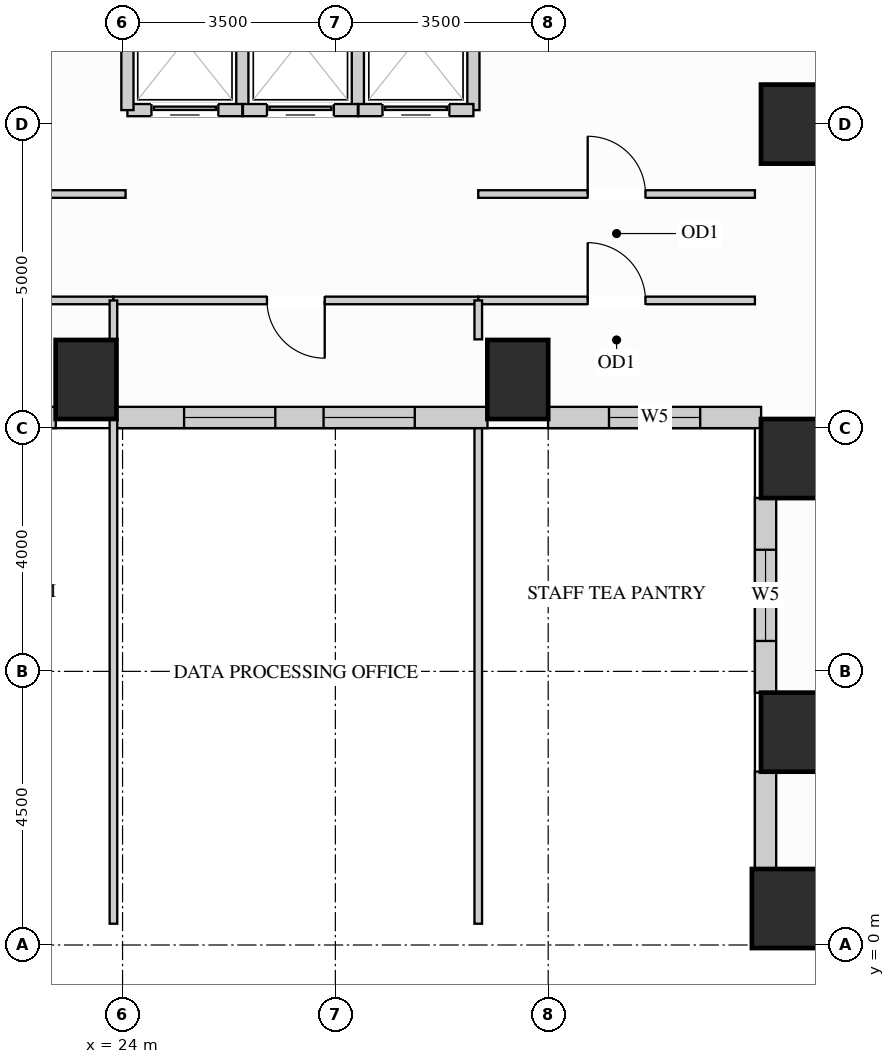
"""IFC4 building model, lengths in metres.
Left out: names, types, materials, properties, quantities, classifications, styles, units other than length and angle.
Written with IfcOpenShell. Run it as: python <this file> out.ifc"""

import sys

from ifc_helpers import new_model, si_unit, direction, frame, frame_2d, origin, origin_2d, place, context, subcontext, project, spatial, rectangle, extrude, source, transform, mapped, element, fill, save


model = new_model("IFC4")
c1 = context("Model", 3, precision=1e-05, world=origin(), true_north=direction((0.0, 1.0)))
c2 = subcontext(c1, "Body", "Model", "MODEL_VIEW")
j1 = project(units=[si_unit("LENGTHUNIT", "METRE"), si_unit("PLANEANGLEUNIT", "RADIAN")], contexts=[c1])
p1 = place(None, origin())
s1 = spatial("IfcSite", under=j1, at=p1, CompositionType="ELEMENT")
p2 = place(p1, origin())
s2 = spatial("IfcBuilding", under=s1, at=p2, CompositionType="ELEMENT")
p3 = place(p2, frame((0.0, 0.0, 36.9)))
s3 = spatial("IfcBuildingStorey", under=s2, at=p3, CompositionType="ELEMENT", Elevation=36.9)
m1 = source(origin(), c2, "Body", "SweptSolid", [
    extrude(rectangle(XDim=1.0, YDim=1.3, at=origin_2d()), origin(), (0.0, 0.0, 1.0), 3.38),
])
for number, where, z_axis, x_axis in (
    (1, (35.0, 13.5, 0.0), (0.0, 0.0, 1.0), (1.0, 0.0, 0.0)),
    (2, (35.0, 3.5, 0.0), (0.0, 0.0, 1.0), (1.0, 0.0, 0.0)),
    (3, (35.0, 8.0, 0.0), (0.0, 0.0, 1.0), (1.0, 0.0, 0.0)),
    (4, (23.4, 9.3, 0.0), (0.0, 0.0, 1.0), (1.0, 0.0, 0.0)),
    (5, (30.5, 9.3, 0.0), (0.0, 0.0, 1.0), (1.0, 0.0, 0.0)),
):
    element("IfcColumn", number, at=place(p3, frame(where, z_axis=z_axis, x_axis=x_axis)), inside=s3, PredefinedType="COLUMN", context=c2, shape_type="MappedRepresentation", body=[
        mapped(m1, transform((0.0, 0.0, 0.0), x_axis=(1.0, 0.0, 0.0), y_axis=(0.0, 1.0, 0.0), z_axis=(0.0, 0.0, 1.0))),
    ])
m2 = source(origin(), c2, "Body", "SweptSolid", [
    extrude(rectangle(XDim=1.3, YDim=1.3, at=origin_2d()), origin(), (0.0, 0.0, 1.0), 3.38),
])
p4 = place(p3, frame((35.0, 0.6, 0.0), z_axis=(0.0, 0.0, 1.0), x_axis=(1.0, 0.0, 0.0)))
e6 = element("IfcColumn", 6, at=p4, inside=s3, PredefinedType="COLUMN", context=c2, shape_type="MappedRepresentation", body=[
    mapped(m2, transform((0.0, 0.0, 0.0), x_axis=(1.0, 0.0, 0.0), y_axis=(0.0, 1.0, 0.0), z_axis=(0.0, 0.0, 1.0))),
])
p5 = place(p3, frame((19.498, 8.675, 0.0), z_axis=(0.0, 0.0, 1.0), x_axis=(1.0, 0.0, 0.0)))
e7 = element("IfcWall", 7, at=p5, inside=s3, PredefinedType="SOLIDWALL", context=c2, shape_type="SweptSolid", body=[
    extrude(rectangle(XDim=3.404, YDim=0.35, at=frame_2d((1.702, 0.0))), origin(), (0.0, 0.0, 1.0), 3.365),
])
p6 = place(p5, frame((0.952, 0.0, 0.78)))
e8 = element("IfcOpeningElement", 8, at=p6, cuts=e7, PredefinedType="OPENING", context=c2, shape_type="SweptSolid", body=[
    extrude(rectangle(XDim=1.5, YDim=2.0, at=frame_2d((0.75, 1.0))), frame((0.0, 0.185, 0.0), z_axis=(0.0, -1.0, 0.0), x_axis=(1.0, 0.0, 0.0)), (0.0, 0.0, 1.0), 0.37),
])
p7 = place(p3, frame((23.898, 8.675, 0.0), z_axis=(0.0, 0.0, 1.0), x_axis=(1.0, 0.0, 0.0)))
e9 = element("IfcWall", 9, at=p7, inside=s3, PredefinedType="SOLIDWALL", context=c2, shape_type="SweptSolid", body=[
    extrude(rectangle(XDim=6.104, YDim=0.35, at=frame_2d((3.052, 0.0))), origin(), (0.0, 0.0, 1.0), 3.365),
])
p8 = place(p7, frame((1.114, 0.0, 0.78)))
e10 = element("IfcOpeningElement", 10, at=p8, cuts=e9, PredefinedType="OPENING", context=c2, shape_type="SweptSolid", body=[
    extrude(rectangle(XDim=1.5, YDim=2.0, at=frame_2d((0.75, 1.0))), frame((0.0, 0.185, 0.0), z_axis=(0.0, -1.0, 0.0), x_axis=(1.0, 0.0, 0.0)), (0.0, 0.0, 1.0), 0.37),
])
p9 = place(p7, frame((3.408, 0.0, 0.78)))
e11 = element("IfcOpeningElement", 11, at=p9, cuts=e9, PredefinedType="OPENING", context=c2, shape_type="SweptSolid", body=[
    extrude(rectangle(XDim=1.5, YDim=2.0, at=frame_2d((0.75, 1.0))), frame((0.0, 0.185, 0.0), z_axis=(0.0, -1.0, 0.0), x_axis=(1.0, 0.0, 0.0)), (0.0, 0.0, 1.0), 0.37),
])
p10 = place(p3, frame((30.998, 8.675, 0.0), z_axis=(0.0, 0.0, 1.0), x_axis=(1.0, 0.0, 0.0)))
e12 = element("IfcWall", 12, at=p10, inside=s3, PredefinedType="SOLIDWALL", context=c2, shape_type="SweptSolid", body=[
    extrude(rectangle(XDim=3.504, YDim=0.35, at=frame_2d((1.752, 0.0))), origin(), (0.0, 0.0, 1.0), 3.365),
])
p11 = place(p10, frame((1.002, 0.0, 0.78)))
e13 = element("IfcOpeningElement", 13, at=p11, cuts=e12, PredefinedType="OPENING", context=c2, shape_type="SweptSolid", body=[
    extrude(rectangle(XDim=1.5, YDim=2.0, at=frame_2d((0.75, 1.0))), frame((0.0, 0.185, 0.0), z_axis=(0.0, -1.0, 0.0), x_axis=(1.0, 0.0, 0.0)), (0.0, 0.0, 1.0), 0.37),
])
p12 = place(p3, frame((34.575, 7.352, 0.0), z_axis=(0.0, 0.0, 1.0), x_axis=(0.0, -1.0, 0.0)))
e14 = element("IfcWall", 14, at=p12, inside=s3, PredefinedType="SOLIDWALL", context=c2, shape_type="SweptSolid", body=[
    extrude(rectangle(XDim=3.204, YDim=0.35, at=frame_2d((1.602, 0.0))), origin(), (0.0, 0.0, 1.0), 2.51),
])
p13 = place(p12, frame((0.852, 0.0, 0.78)))
e15 = element("IfcOpeningElement", 15, at=p13, cuts=e14, PredefinedType="OPENING", context=c2, shape_type="SweptSolid", body=[
    extrude(rectangle(XDim=1.5, YDim=1.55, at=frame_2d((0.75, 0.775))), frame((0.0, 0.185, 0.0), z_axis=(0.0, -1.0, 0.0), x_axis=(1.0, 0.0, 0.0)), (0.0, 0.0, 1.0), 0.37),
])
m3 = source(origin(), c2, "Body", "SweptSolid", [
    extrude(rectangle(XDim=1.604, YDim=0.35, at=frame_2d((0.802, 0.0))), origin(), (0.0, 0.0, 1.0), 2.51),
])
p14 = place(p3, frame((34.575, 2.852, 0.0), z_axis=(0.0, 0.0, 1.0), x_axis=(0.0, -1.0, 0.0)))
e16 = element("IfcWall", 16, at=p14, inside=s3, PredefinedType="SOLIDWALL", context=c2, shape_type="MappedRepresentation", body=[
    mapped(m3, transform((0.0, 0.0, 0.0), x_axis=(1.0, 0.0, 0.0), y_axis=(0.0, 1.0, 0.0), z_axis=(0.0, 0.0, 1.0))),
])
p15 = place(p3, frame((29.85, 12.35, 0.0), z_axis=(0.0, 0.0, 1.0), x_axis=(1.0, 0.0, 0.0)))
e17 = element("IfcWall", 17, at=p15, inside=s3, PredefinedType="PARTITIONING", context=c2, shape_type="SweptSolid", body=[
    extrude(rectangle(XDim=4.55, YDim=0.125, at=frame_2d((2.275, 0.0))), origin(), (0.0, 0.0, 1.0), 3.365),
])
p16 = place(p15, frame((1.8, 0.0, 0.0)))
e18 = element("IfcOpeningElement", 18, at=p16, cuts=e17, PredefinedType="OPENING", context=c2, shape_type="SweptSolid", body=[
    extrude(rectangle(XDim=0.95, YDim=2.15, at=frame_2d((0.475, 1.075))), frame((0.0, 0.073, 0.0), z_axis=(0.0, -1.0, 0.0), x_axis=(1.0, 0.0, 0.0)), (0.0, 0.0, 1.0), 0.145),
])
p17 = place(p3, frame((19.5, 12.35, 0.0), z_axis=(0.0, 0.0, 1.0), x_axis=(1.0, 0.0, 0.0)))
e19 = element("IfcWall", 19, at=p17, inside=s3, PredefinedType="PARTITIONING", context=c2, shape_type="SweptSolid", body=[
    extrude(rectangle(XDim=4.55, YDim=0.125, at=frame_2d((2.275, 0.0))), origin(), (0.0, 0.0, 1.0), 3.365),
])
p18 = place(p17, frame((1.8, 0.0, 0.0)))
e20 = element("IfcOpeningElement", 20, at=p18, cuts=e19, PredefinedType="OPENING", context=c2, shape_type="SweptSolid", body=[
    extrude(rectangle(XDim=0.95, YDim=2.15, at=frame_2d((0.475, 1.075))), frame((0.0, 0.073, 0.0), z_axis=(0.0, -1.0, 0.0), x_axis=(1.0, 0.0, 0.0)), (0.0, 0.0, 1.0), 0.145),
])
p19 = place(p3, frame((19.5, 10.6, 0.0), z_axis=(0.0, 0.0, 1.0), x_axis=(1.0, 0.0, 0.0)))
e21 = element("IfcWall", 21, at=p19, inside=s3, PredefinedType="PARTITIONING", context=c2, shape_type="SweptSolid", body=[
    extrude(rectangle(XDim=4.35, YDim=0.125, at=frame_2d((2.175, 0.0))), origin(), (0.0, 0.0, 1.0), 3.365),
])
p20 = place(p19, frame((1.7, 0.0, 0.0)))
e22 = element("IfcOpeningElement", 22, at=p20, cuts=e21, PredefinedType="OPENING", context=c2, shape_type="SweptSolid", body=[
    extrude(rectangle(XDim=0.95, YDim=2.15, at=frame_2d((0.475, 1.075))), frame((0.0, 0.073, 0.0), z_axis=(0.0, -1.0, 0.0), x_axis=(1.0, 0.0, 0.0)), (0.0, 0.0, 1.0), 0.145),
])
p21 = place(p3, frame((23.85, 10.6, 0.0), z_axis=(0.0, 0.0, 1.0), x_axis=(1.0, 0.0, 0.0)))
e23 = element("IfcWall", 23, at=p21, inside=s3, PredefinedType="PARTITIONING", context=c2, shape_type="SweptSolid", body=[
    extrude(rectangle(XDim=6.0, YDim=0.125, at=frame_2d((3.0, 0.0))), origin(), (0.0, 0.0, 1.0), 3.365),
])
p22 = place(p21, frame((2.525, 0.0, 0.0)))
e24 = element("IfcOpeningElement", 24, at=p22, cuts=e23, PredefinedType="OPENING", context=c2, shape_type="SweptSolid", body=[
    extrude(rectangle(XDim=0.95, YDim=2.15, at=frame_2d((0.475, 1.075))), frame((0.0, 0.073, 0.0), z_axis=(0.0, -1.0, 0.0), x_axis=(1.0, 0.0, 0.0)), (0.0, 0.0, 1.0), 0.145),
])
p23 = place(p3, frame((29.85, 10.6, 0.0), z_axis=(0.0, 0.0, 1.0), x_axis=(1.0, 0.0, 0.0)))
e25 = element("IfcWall", 25, at=p23, inside=s3, PredefinedType="PARTITIONING", context=c2, shape_type="SweptSolid", body=[
    extrude(rectangle(XDim=4.55, YDim=0.125, at=frame_2d((2.275, 0.0))), origin(), (0.0, 0.0, 1.0), 3.365),
])
p24 = place(p23, frame((1.8, 0.0, 0.0)))
e26 = element("IfcOpeningElement", 26, at=p24, cuts=e25, PredefinedType="OPENING", context=c2, shape_type="SweptSolid", body=[
    extrude(rectangle(XDim=0.95, YDim=2.15, at=frame_2d((0.475, 1.075))), frame((0.0, 0.073, 0.0), z_axis=(0.0, -1.0, 0.0), x_axis=(1.0, 0.0, 0.0)), (0.0, 0.0, 1.0), 0.145),
])
m4 = source(origin(), c2, "Body", "SweptSolid", [
    extrude(rectangle(XDim=8.29, YDim=0.125, at=frame_2d((4.145, 0.0))), origin(), (0.0, 0.0, 1.0), 3.365),
])
p25 = place(p3, frame((23.85, 0.35, 0.0), z_axis=(0.0, 0.0, 1.0), x_axis=(0.0, 1.0, 0.0)))
e27 = element("IfcWall", 27, at=p25, inside=s3, PredefinedType="PARTITIONING", context=c2, shape_type="MappedRepresentation", body=[
    mapped(m4, transform((0.0, 0.0, 0.0), x_axis=(1.0, 0.0, 0.0), y_axis=(0.0, 1.0, 0.0), z_axis=(0.0, 0.0, 1.0))),
])
m5 = source(origin(), c2, "Body", "SweptSolid", [
    extrude(rectangle(XDim=0.64, YDim=0.125, at=frame_2d((0.32, 0.0))), origin(), (0.0, 0.0, 1.0), 3.365),
])
p26 = place(p3, frame((23.85, 9.96, 0.0), z_axis=(0.0, 0.0, 1.0), x_axis=(0.0, 1.0, 0.0)))
e28 = element("IfcWall", 28, at=p26, inside=s3, PredefinedType="PARTITIONING", context=c2, shape_type="MappedRepresentation", body=[
    mapped(m5, transform((0.0, 0.0, 0.0), x_axis=(1.0, 0.0, 0.0), y_axis=(0.0, 1.0, 0.0), z_axis=(0.0, 0.0, 1.0))),
])
m6 = source(origin(), c2, "Body", "SweptSolid", [
    extrude(rectangle(XDim=8.148, YDim=0.125, at=frame_2d((4.074, 0.0))), origin(), (0.0, 0.0, 1.0), 3.365),
])
p27 = place(p3, frame((29.85, 0.35, 0.0), z_axis=(0.0, 0.0, 1.0), x_axis=(0.0, 1.0, 0.0)))
e29 = element("IfcWall", 29, at=p27, inside=s3, PredefinedType="PARTITIONING", context=c2, shape_type="MappedRepresentation", body=[
    mapped(m6, transform((0.0, 0.0, 0.0), x_axis=(1.0, 0.0, 0.0), y_axis=(0.0, 1.0, 0.0), z_axis=(0.0, 0.0, 1.0))),
])
p28 = place(p3, frame((29.85, 9.96, 0.0), z_axis=(0.0, 0.0, 1.0), x_axis=(0.0, 1.0, 0.0)))
e30 = element("IfcWall", 30, at=p28, inside=s3, PredefinedType="PARTITIONING", context=c2, shape_type="MappedRepresentation", body=[
    mapped(m5, transform((0.0, 0.0, 0.0), x_axis=(1.0, 0.0, 0.0), y_axis=(0.0, 1.0, 0.0), z_axis=(0.0, 0.0, 1.0))),
])
m7 = source(origin(), c2, "Body", "SweptSolid", [
    extrude(rectangle(XDim=2.29, YDim=0.2, at=frame_2d((1.145, 0.0))), origin(), (0.0, 0.0, 1.0), 3.365),
])
p29 = place(p3, frame((25.97, 13.73, 0.0), z_axis=(0.0, 0.0, 1.0), x_axis=(0.0, 1.0, 0.0)))
e31 = element("IfcWall", 31, at=p29, inside=s3, PredefinedType="PARTITIONING", context=c2, shape_type="MappedRepresentation", body=[
    mapped(m7, transform((0.0, 0.0, 0.0), x_axis=(1.0, 0.0, 0.0), y_axis=(0.0, 1.0, 0.0), z_axis=(0.0, 0.0, 1.0))),
])
p30 = place(p3, frame((24.08, 13.73, 0.0), z_axis=(0.0, 0.0, 1.0), x_axis=(1.0, 0.0, 0.0)))
e32 = element("IfcWall", 32, at=p30, inside=s3, PredefinedType="PARTITIONING", context=c2, shape_type="SweptSolid", body=[
    extrude(rectangle(XDim=1.89, YDim=0.2, at=frame_2d((0.945, 0.0))), origin(), (0.0, 0.0, 1.0), 2.446),
])
p31 = place(p30, frame((0.395, 0.0, 0.0)))
e33 = element("IfcOpeningElement", 33, at=p31, cuts=e32, PredefinedType="OPENING", context=c2, shape_type="SweptSolid", body=[
    extrude(rectangle(XDim=1.1, YDim=2.2, at=frame_2d((0.55, 1.1))), frame((0.0, 0.11, 0.0), z_axis=(0.0, -1.0, 0.0), x_axis=(1.0, 0.0, 0.0)), (0.0, 0.0, 1.0), 0.22),
])
for number, where, z_axis, x_axis in (
    (34, (24.08, 13.73, 0.0), (0.0, 0.0, 1.0), (0.0, 1.0, 0.0)),
    (35, (27.87, 13.73, 0.0), (0.0, 0.0, 1.0), (0.0, 1.0, 0.0)),
):
    element("IfcWall", number, at=place(p3, frame(where, z_axis=z_axis, x_axis=x_axis)), inside=s3, PredefinedType="PARTITIONING", context=c2, shape_type="MappedRepresentation", body=[
        mapped(m7, transform((0.0, 0.0, 0.0), x_axis=(1.0, 0.0, 0.0), y_axis=(0.0, 1.0, 0.0), z_axis=(0.0, 0.0, 1.0))),
    ])
p32 = place(p3, frame((25.98, 13.73, 0.0), z_axis=(0.0, 0.0, 1.0), x_axis=(1.0, 0.0, 0.0)))
e36 = element("IfcWall", 36, at=p32, inside=s3, PredefinedType="PARTITIONING", context=c2, shape_type="SweptSolid", body=[
    extrude(rectangle(XDim=1.89, YDim=0.2, at=frame_2d((0.945, 0.0))), origin(), (0.0, 0.0, 1.0), 2.446),
])
p33 = place(p32, frame((0.395, 0.0, 0.0)))
e37 = element("IfcOpeningElement", 37, at=p33, cuts=e36, PredefinedType="OPENING", context=c2, shape_type="SweptSolid", body=[
    extrude(rectangle(XDim=1.1, YDim=2.2, at=frame_2d((0.55, 1.1))), frame((0.0, 0.11, 0.0), z_axis=(0.0, -1.0, 0.0), x_axis=(1.0, 0.0, 0.0)), (0.0, 0.0, 1.0), 0.22),
])
p34 = place(p3, frame((29.77, 13.73, 0.0), z_axis=(0.0, 0.0, 1.0), x_axis=(0.0, 1.0, 0.0)))
e38 = element("IfcWall", 38, at=p34, inside=s3, PredefinedType="PARTITIONING", context=c2, shape_type="MappedRepresentation", body=[
    mapped(m7, transform((0.0, 0.0, 0.0), x_axis=(1.0, 0.0, 0.0), y_axis=(0.0, 1.0, 0.0), z_axis=(0.0, 0.0, 1.0))),
])
p35 = place(p3, frame((27.88, 13.73, 0.0), z_axis=(0.0, 0.0, 1.0), x_axis=(1.0, 0.0, 0.0)))
e39 = element("IfcWall", 39, at=p35, inside=s3, PredefinedType="PARTITIONING", context=c2, shape_type="SweptSolid", body=[
    extrude(rectangle(XDim=1.89, YDim=0.2, at=frame_2d((0.945, 0.0))), origin(), (0.0, 0.0, 1.0), 2.446),
])
p36 = place(p35, frame((0.395, 0.0, 0.0)))
e40 = element("IfcOpeningElement", 40, at=p36, cuts=e39, PredefinedType="OPENING", context=c2, shape_type="SweptSolid", body=[
    extrude(rectangle(XDim=1.1, YDim=2.2, at=frame_2d((0.55, 1.1))), frame((0.0, 0.11, 0.0), z_axis=(0.0, -1.0, 0.0), x_axis=(1.0, 0.0, 0.0)), (0.0, 0.0, 1.0), 0.22),
])
m8 = source(origin(), c2, "Body", "SweptSolid", [
    extrude(rectangle(XDim=1.1, YDim=2.2, at=frame_2d((0.55, 1.1))), frame((0.0, 0.025, 0.0), z_axis=(0.0, -1.0, 0.0), x_axis=(1.0, 0.0, 0.0)), (0.0, 0.0, 1.0), 0.05),
])
p37 = place(p31, origin())
e41 = element("IfcDoor", 41, at=p37, inside=s3, OperationType="SLIDING_TO_LEFT", PredefinedType="DOOR", context=c2, shape_type="MappedRepresentation", body=[
    mapped(m8, transform((0.0, 0.0, 0.0), x_axis=(1.0, 0.0, 0.0), y_axis=(0.0, 1.0, 0.0), z_axis=(0.0, 0.0, 1.0))),
])
fill(e33, e41)
p38 = place(p33, origin())
e42 = element("IfcDoor", 42, at=p38, inside=s3, OperationType="SLIDING_TO_LEFT", PredefinedType="DOOR", context=c2, shape_type="MappedRepresentation", body=[
    mapped(m8, transform((0.0, 0.0, 0.0), x_axis=(1.0, 0.0, 0.0), y_axis=(0.0, 1.0, 0.0), z_axis=(0.0, 0.0, 1.0))),
])
fill(e37, e42)
p39 = place(p36, origin())
e43 = element("IfcDoor", 43, at=p39, inside=s3, OperationType="SLIDING_TO_LEFT", PredefinedType="DOOR", context=c2, shape_type="MappedRepresentation", body=[
    mapped(m8, transform((0.0, 0.0, 0.0), x_axis=(1.0, 0.0, 0.0), y_axis=(0.0, 1.0, 0.0), z_axis=(0.0, 0.0, 1.0))),
])
fill(e40, e43)
m9 = source(origin(), c2, "Body", "SweptSolid", [
    extrude(rectangle(XDim=0.95, YDim=2.15, at=frame_2d((0.475, 1.075))), frame((0.0, 0.025, 0.0), z_axis=(0.0, -1.0, 0.0), x_axis=(1.0, 0.0, 0.0)), (0.0, 0.0, 1.0), 0.05),
])
p40 = place(p16, origin())
e44 = element("IfcDoor", 44, at=p40, inside=s3, OperationType="SINGLE_SWING_LEFT", PredefinedType="DOOR", context=c2, shape_type="MappedRepresentation", body=[
    mapped(m9, transform((0.0, 0.0, 0.0), x_axis=(1.0, 0.0, 0.0), y_axis=(0.0, 1.0, 0.0), z_axis=(0.0, 0.0, 1.0))),
])
fill(e18, e44)
p41 = place(p22, origin())
e45 = element("IfcDoor", 45, at=p41, inside=s3, OperationType="SINGLE_SWING_RIGHT", PredefinedType="DOOR", context=c2, shape_type="MappedRepresentation", body=[
    mapped(m9, transform((0.0, 0.0, 0.0), x_axis=(1.0, 0.0, 0.0), y_axis=(0.0, 1.0, 0.0), z_axis=(0.0, 0.0, 1.0))),
])
fill(e24, e45)
p42 = place(p24, origin())
e46 = element("IfcDoor", 46, at=p42, inside=s3, OperationType="SINGLE_SWING_LEFT", PredefinedType="DOOR", context=c2, shape_type="MappedRepresentation", body=[
    mapped(m9, transform((0.0, 0.0, 0.0), x_axis=(1.0, 0.0, 0.0), y_axis=(0.0, 1.0, 0.0), z_axis=(0.0, 0.0, 1.0))),
])
fill(e26, e46)
m10 = source(origin(), c2, "Body", "SweptSolid", [
    extrude(rectangle(XDim=1.5, YDim=2.0, at=frame_2d((0.75, 1.0))), frame((0.0, 0.03, 0.0), z_axis=(0.0, -1.0, 0.0), x_axis=(1.0, 0.0, 0.0)), (0.0, 0.0, 1.0), 0.06),
])
p43 = place(p8, origin())
e47 = element("IfcWindow", 47, at=p43, inside=s3, PartitioningType="SINGLE_PANEL", PredefinedType="WINDOW", context=c2, shape_type="MappedRepresentation", body=[
    mapped(m10, transform((0.0, 0.0, 0.0), x_axis=(1.0, 0.0, 0.0), y_axis=(0.0, 1.0, 0.0), z_axis=(0.0, 0.0, 1.0))),
])
fill(e10, e47)
p44 = place(p9, origin())
e48 = element("IfcWindow", 48, at=p44, inside=s3, PartitioningType="SINGLE_PANEL", PredefinedType="WINDOW", context=c2, shape_type="MappedRepresentation", body=[
    mapped(m10, transform((0.0, 0.0, 0.0), x_axis=(1.0, 0.0, 0.0), y_axis=(0.0, 1.0, 0.0), z_axis=(0.0, 0.0, 1.0))),
])
fill(e11, e48)
p45 = place(p11, origin())
e49 = element("IfcWindow", 49, at=p45, inside=s3, PartitioningType="SINGLE_PANEL", PredefinedType="WINDOW", context=c2, shape_type="MappedRepresentation", body=[
    mapped(m10, transform((0.0, 0.0, 0.0), x_axis=(1.0, 0.0, 0.0), y_axis=(0.0, 1.0, 0.0), z_axis=(0.0, 0.0, 1.0))),
])
fill(e13, e49)
m11 = source(origin(), c2, "Body", "SweptSolid", [
    extrude(rectangle(XDim=1.5, YDim=1.55, at=frame_2d((0.75, 0.775))), frame((0.0, 0.03, 0.0), z_axis=(0.0, -1.0, 0.0), x_axis=(1.0, 0.0, 0.0)), (0.0, 0.0, 1.0), 0.06),
])
p46 = place(p13, origin())
e50 = element("IfcWindow", 50, at=p46, inside=s3, PartitioningType="SINGLE_PANEL", PredefinedType="WINDOW", context=c2, shape_type="MappedRepresentation", body=[
    mapped(m11, transform((0.0, 0.0, 0.0), x_axis=(1.0, 0.0, 0.0), y_axis=(0.0, 1.0, 0.0), z_axis=(0.0, 0.0, 1.0))),
])
fill(e15, e50)
save(model, sys.argv[1])
